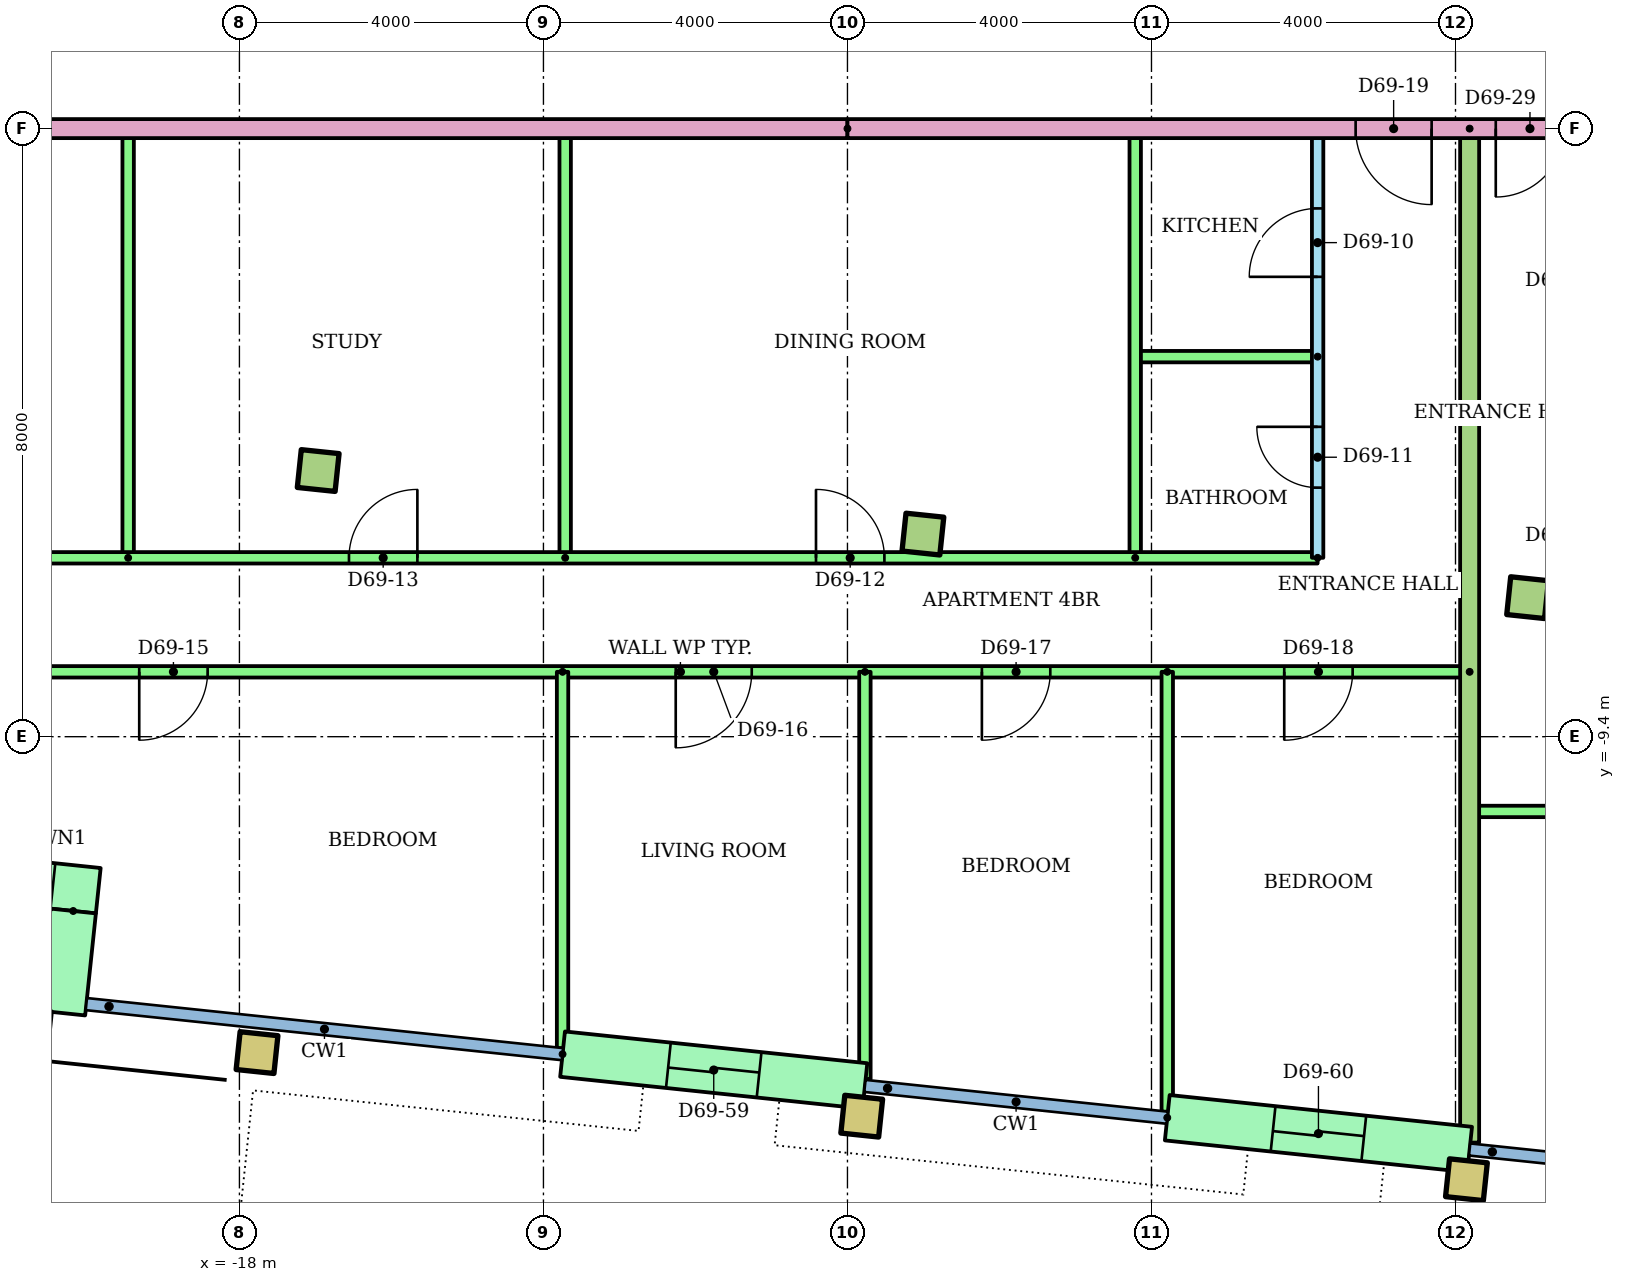
"""IFC4 building model, lengths in metres.
Left out: names, types, materials, properties, quantities, classifications, styles, units other than length and angle.
Written with IfcOpenShell. Run it as: python <this file> out.ifc"""

import sys

from ifc_helpers import new_model, si_unit, direction, frame, frame_2d, origin, origin_2d, place, context, subcontext, project, spatial, rectangle, hollow_rectangle, extrude, element, fill, save


model = new_model("IFC4")
c1 = context("Model", 3, precision=1e-05, world=origin(), true_north=direction((0.0, 1.0)))
c2 = subcontext(c1, "Body", "Model", "MODEL_VIEW")
j1 = project(units=[si_unit("LENGTHUNIT", "METRE"), si_unit("PLANEANGLEUNIT", "RADIAN")], contexts=[c1])
p1 = place(None, origin())
s1 = spatial("IfcSite", under=j1, at=p1, CompositionType="ELEMENT")
p2 = place(p1, origin())
s2 = spatial("IfcBuilding", under=s1, at=p2, CompositionType="ELEMENT")
p3 = place(p2, frame((0.0, 0.0, 265.9)))
s3 = spatial("IfcBuildingStorey", under=s2, at=p3, CompositionType="ELEMENT", Elevation=265.9)
for number, where, z_axis, x_axis in (
    (1, (-17.768, -13.556, 0.0), (0.0, 0.0, 1.0), (0.995, -0.105, 0.0)),
    (2, (-9.812, -14.392, 0.0), (0.0, 0.0, 1.0), (0.995, -0.105, 0.0)),
    (3, (-1.856, -15.229, 0.0), (0.0, 0.0, 1.0), (0.995, -0.105, 0.0)),
):
    element("IfcColumn", number, at=place(p3, frame(where, z_axis=z_axis, x_axis=x_axis)), inside=s3, PredefinedType="COLUMN", context=c2, shape_type="SweptSolid", body=[
        extrude(hollow_rectangle(XDim=0.5, YDim=0.5, WallThickness=0.025, at=origin_2d()), origin(), (0.0, 0.0, 1.0), 3.2),
    ])
for number, where, z_axis, x_axis in (
    (4, (-16.964, -5.898, 0.0), (0.0, 0.0, 1.0), (0.995, -0.105, 0.0)),
    (5, (-9.007, -6.735, 0.0), (0.0, 0.0, 1.0), (0.995, -0.105, 0.0)),
    (6, (-1.051, -7.571, 0.0), (0.0, 0.0, 1.0), (0.995, -0.105, 0.0)),
):
    element("IfcColumn", number, at=place(p3, frame(where, z_axis=z_axis, x_axis=x_axis)), inside=s3, PredefinedType="COLUMN", context=c2, shape_type="SweptSolid", body=[
        extrude(rectangle(XDim=0.5, YDim=0.5, at=origin_2d()), origin(), (0.0, 0.0, 1.0), 3.2),
    ])
p4 = place(p3, frame((-21.946, -11.207, 0.0), z_axis=(0.0, 0.0, 1.0), x_axis=(0.994511820899, -0.104624271047, 0.0)))
e7 = element("IfcWall", 7, at=p4, inside=s3, PredefinedType="STANDARD", context=c2, shape_type="SweptSolid", body=[
    extrude(rectangle(XDim=2.1, YDim=0.6, at=frame_2d((1.05, 0.0))), origin(), (0.0, 0.0, 1.0), 2.92),
])
p5 = place(p4, frame((0.6, 0.0, 0.9)))
e8 = element("IfcOpeningElement", 8, at=p5, cuts=e7, PredefinedType="OPENING", context=c2, shape_type="SweptSolid", body=[
    extrude(rectangle(XDim=0.9, YDim=1.5, at=frame_2d((0.45, 0.75))), frame((0.0, 0.31, 0.0), z_axis=(0.0, -1.0, 0.0), x_axis=(1.0, 0.0, 0.0)), (0.0, 0.0, 1.0), 0.62),
])
p6 = place(p3, frame((-20.187, -11.693, 0.0), z_axis=(0.0, 0.0, 1.0), x_axis=(-0.1043365026, -0.994542052517, 0.0)))
e9 = element("IfcWall", 9, at=p6, inside=s3, PredefinedType="STANDARD", context=c2, shape_type="SweptSolid", body=[
    extrude(rectangle(XDim=1.35, YDim=0.6, at=frame_2d((0.675, 0.0))), origin(), (0.0, 0.0, 1.0), 2.92),
])
p7 = place(p3, frame((-13.749, -13.576, 0.0), z_axis=(0.0, 0.0, 1.0), x_axis=(0.994519156568, -0.104554517933, 0.0)))
e10 = element("IfcWall", 10, at=p7, inside=s3, PredefinedType="STANDARD", context=c2, shape_type="SweptSolid", body=[
    extrude(rectangle(XDim=4.0, YDim=0.6, at=frame_2d((2.0, 0.0))), origin(), (0.0, 0.0, 1.0), 2.92),
])
p8 = place(p7, frame((1.4, 0.0, 0.0)))
e11 = element("IfcOpeningElement", 11, at=p8, cuts=e10, PredefinedType="OPENING", context=c2, shape_type="SweptSolid", body=[
    extrude(rectangle(XDim=1.2, YDim=2.1, at=frame_2d((0.6, 1.05))), frame((0.0, 0.31, 0.0), z_axis=(0.0, -1.0, 0.0), x_axis=(1.0, 0.0, 0.0)), (0.0, 0.0, 1.0), 0.62),
])
p9 = place(p3, frame((-5.792, -14.413, 0.0), z_axis=(0.0, 0.0, 1.0), x_axis=(0.99452550138, -0.104494148666, 0.0)))
e12 = element("IfcWall", 12, at=p9, inside=s3, PredefinedType="STANDARD", context=c2, shape_type="SweptSolid", body=[
    extrude(rectangle(XDim=4.0, YDim=0.6, at=frame_2d((2.0, 0.0))), origin(), (0.0, 0.0, 1.0), 2.92),
])
p10 = place(p9, frame((1.4, 0.0, 0.0)))
e13 = element("IfcOpeningElement", 13, at=p10, cuts=e12, PredefinedType="OPENING", context=c2, shape_type="SweptSolid", body=[
    extrude(rectangle(XDim=1.2, YDim=2.1, at=frame_2d((0.6, 1.05))), frame((0.0, 0.31, 0.0), z_axis=(0.0, -1.0, 0.0), x_axis=(1.0, 0.0, 0.0)), (0.0, 0.0, 1.0), 0.62),
])
p11 = place(p3, frame((-3.814, -7.047, 0.0), z_axis=(0.0, 0.0, 1.0), x_axis=(0.0, 1.0, 0.0)))
e14 = element("IfcWall", 14, at=p11, inside=s3, PredefinedType="PARTITIONING", context=c2, shape_type="SweptSolid", body=[
    extrude(rectangle(XDim=5.647, YDim=0.15, at=frame_2d((2.823, 0.0))), origin(), (0.0, 0.0, 1.0), 2.4),
])
p12 = place(p11, frame((3.697, 0.0, 0.0)))
e15 = element("IfcOpeningElement", 15, at=p12, cuts=e14, PredefinedType="OPENING", context=c2, shape_type="SweptSolid", body=[
    extrude(rectangle(XDim=0.9, YDim=2.1, at=frame_2d((0.45, 1.05))), frame((0.0, 0.085, 0.0), z_axis=(0.0, -1.0, 0.0), x_axis=(1.0, 0.0, 0.0)), (0.0, 0.0, 1.0), 0.17),
])
p13 = place(p11, frame((0.923, 0.0, 0.0)))
e16 = element("IfcOpeningElement", 16, at=p13, cuts=e14, PredefinedType="OPENING", context=c2, shape_type="SweptSolid", body=[
    extrude(rectangle(XDim=0.8, YDim=2.1, at=frame_2d((0.4, 1.05))), frame((0.0, 0.085, 0.0), z_axis=(0.0, -1.0, 0.0), x_axis=(1.0, 0.0, 0.0)), (0.0, 0.0, 1.0), 0.17),
])
p14 = place(p3, frame((-3.814, -4.4, 0.0), z_axis=(0.0, 0.0, 1.0), x_axis=(-1.0, 0.0, 0.0)))
e17 = element("IfcWall", 17, at=p14, inside=s3, PredefinedType="PARTITIONING", context=c2, shape_type="SweptSolid", body=[
    extrude(rectangle(XDim=2.4, YDim=0.15, at=frame_2d((1.2, 0.0))), origin(), (0.0, 0.0, 1.0), 2.4),
])
for number, where, z_axis, x_axis in (
    (18, (-6.214, -7.047, 0.0), (0.0, 0.0, 1.0), (0.0, 1.0, 0.0)),
    (19, (-13.714, -7.047, 0.0), (0.0, 0.0, 1.0), (0.0, 1.0, 0.0)),
    (20, (-19.464, -7.047, 0.0), (0.0, 0.0, 1.0), (0.0, 1.0, 0.0)),
):
    element("IfcWall", number, at=place(p3, frame(where, z_axis=z_axis, x_axis=x_axis)), inside=s3, PredefinedType="PARTITIONING", context=c2, shape_type="SweptSolid", body=[
        extrude(rectangle(XDim=5.647, YDim=0.15, at=frame_2d((2.823, 0.0))), origin(), (0.0, 0.0, 1.0), 2.4),
    ])
p15 = place(p3, frame((-24.144, -7.047, 0.0)))
e21 = element("IfcWall", 21, at=p15, inside=s3, PredefinedType="PARTITIONING", context=c2, shape_type="SweptSolid", body=[
    extrude(rectangle(XDim=20.33, YDim=0.15, at=frame_2d((10.165, 0.0))), origin(), (0.0, 0.0, 1.0), 2.4),
])
p16 = place(p15, frame((13.73, 0.0, 0.0)))
e22 = element("IfcOpeningElement", 22, at=p16, cuts=e21, PredefinedType="OPENING", context=c2, shape_type="SweptSolid", body=[
    extrude(rectangle(XDim=0.9, YDim=2.1, at=frame_2d((0.45, 1.05))), frame((0.0, 0.085, 0.0), z_axis=(0.0, -1.0, 0.0), x_axis=(1.0, 0.0, 0.0)), (0.0, 0.0, 1.0), 0.17),
])
p17 = place(p15, frame((7.585, 0.0, 0.0)))
e23 = element("IfcOpeningElement", 23, at=p17, cuts=e21, PredefinedType="OPENING", context=c2, shape_type="SweptSolid", body=[
    extrude(rectangle(XDim=0.9, YDim=2.1, at=frame_2d((0.45, 1.05))), frame((0.0, 0.085, 0.0), z_axis=(0.0, -1.0, 0.0), x_axis=(1.0, 0.0, 0.0)), (0.0, 0.0, 1.0), 0.17),
])
p18 = place(p15, frame((1.968, 0.0, 0.0)))
e24 = element("IfcOpeningElement", 24, at=p18, cuts=e21, PredefinedType="OPENING", context=c2, shape_type="SweptSolid", body=[
    extrude(rectangle(XDim=0.9, YDim=2.1, at=frame_2d((0.45, 1.05))), frame((0.0, 0.085, 0.0), z_axis=(0.0, -1.0, 0.0), x_axis=(1.0, 0.0, 0.0)), (0.0, 0.0, 1.0), 0.17),
])
p19 = place(p3, frame((-1.814, -8.547, 0.0), z_axis=(0.0, 0.0, 1.0), x_axis=(-1.0, 0.0, 0.0)))
e25 = element("IfcWall", 25, at=p19, inside=s3, PredefinedType="PARTITIONING", context=c2, shape_type="SweptSolid", body=[
    extrude(rectangle(XDim=20.767, YDim=0.15, at=frame_2d((10.384, 0.0))), origin(), (0.0, 0.0, 1.0), 2.4),
])
p20 = place(p19, frame((16.604, 0.0, 0.0)))
e26 = element("IfcOpeningElement", 26, at=p20, cuts=e25, PredefinedType="OPENING", context=c2, shape_type="SweptSolid", body=[
    extrude(rectangle(XDim=0.9, YDim=2.1, at=frame_2d((0.45, 1.05))), frame((0.0, 0.085, 0.0), z_axis=(0.0, -1.0, 0.0), x_axis=(1.0, 0.0, 0.0)), (0.0, 0.0, 1.0), 0.17),
])
p21 = place(p19, frame((9.446, 0.0, 0.0)))
e27 = element("IfcOpeningElement", 27, at=p21, cuts=e25, PredefinedType="OPENING", context=c2, shape_type="SweptSolid", body=[
    extrude(rectangle(XDim=1.0, YDim=2.1, at=frame_2d((0.5, 1.05))), frame((0.0, 0.085, 0.0), z_axis=(0.0, -1.0, 0.0), x_axis=(1.0, 0.0, 0.0)), (0.0, 0.0, 1.0), 0.17),
])
p22 = place(p19, frame((5.517, 0.0, 0.0)))
e28 = element("IfcOpeningElement", 28, at=p22, cuts=e25, PredefinedType="OPENING", context=c2, shape_type="SweptSolid", body=[
    extrude(rectangle(XDim=0.9, YDim=2.1, at=frame_2d((0.45, 1.05))), frame((0.0, 0.085, 0.0), z_axis=(0.0, -1.0, 0.0), x_axis=(1.0, 0.0, 0.0)), (0.0, 0.0, 1.0), 0.17),
])
p23 = place(p19, frame((1.539, 0.0, 0.0)))
e29 = element("IfcOpeningElement", 29, at=p23, cuts=e25, PredefinedType="OPENING", context=c2, shape_type="SweptSolid", body=[
    extrude(rectangle(XDim=0.9, YDim=2.1, at=frame_2d((0.45, 1.05))), frame((0.0, 0.085, 0.0), z_axis=(0.0, -1.0, 0.0), x_axis=(1.0, 0.0, 0.0)), (0.0, 0.0, 1.0), 0.17),
])
p24 = place(p3, frame((-13.749, -8.547, 0.0), z_axis=(0.0, 0.0, 1.0), x_axis=(0.0, -1.0, 0.0)))
e30 = element("IfcWall", 30, at=p24, inside=s3, PredefinedType="PARTITIONING", context=c2, shape_type="SweptSolid", body=[
    extrude(rectangle(XDim=4.95, YDim=0.15, at=frame_2d((2.475, 0.0))), origin(), (0.0, 0.0, 1.0), 2.4),
])
p25 = place(p3, frame((-9.771, -8.547, 0.0), z_axis=(0.0, 0.0, 1.0), x_axis=(0.0, -1.0, 0.0)))
e31 = element("IfcWall", 31, at=p25, inside=s3, PredefinedType="PARTITIONING", context=c2, shape_type="SweptSolid", body=[
    extrude(rectangle(XDim=5.358, YDim=0.15, at=frame_2d((2.679, 0.0))), origin(), (0.0, 0.0, 1.0), 2.4),
])
p26 = place(p3, frame((-5.792, -8.547, 0.0), z_axis=(0.0, 0.0, 1.0), x_axis=(0.0, -1.0, 0.0)))
e32 = element("IfcWall", 32, at=p26, inside=s3, PredefinedType="PARTITIONING", context=c2, shape_type="SweptSolid", body=[
    extrude(rectangle(XDim=5.787, YDim=0.15, at=frame_2d((2.893, 0.0))), origin(), (0.0, 0.0, 1.0), 2.4),
])
p27 = place(p3, frame((14.098, -10.384, 0.0), z_axis=(0.0, 0.0, 1.0), x_axis=(-1.0, 0.0, 0.0)))
e33 = element("IfcWall", 33, at=p27, inside=s3, PredefinedType="PARTITIONING", context=c2, shape_type="SweptSolid", body=[
    extrude(rectangle(XDim=15.912, YDim=0.15, at=frame_2d((7.956, 0.0))), origin(), (0.0, 0.0, 1.0), 2.4),
])
p28 = place(p27, frame((13.473, 0.0, 0.0)))
e34 = element("IfcOpeningElement", 34, at=p28, cuts=e33, PredefinedType="OPENING", context=c2, shape_type="SweptSolid", body=[
    extrude(rectangle(XDim=0.9, YDim=2.1, at=frame_2d((0.45, 1.05))), frame((0.0, 0.085, 0.0), z_axis=(0.0, -1.0, 0.0), x_axis=(1.0, 0.0, 0.0)), (0.0, 0.0, 1.0), 0.17),
])
p29 = place(p27, frame((9.495, 0.0, 0.0)))
e35 = element("IfcOpeningElement", 35, at=p29, cuts=e33, PredefinedType="OPENING", context=c2, shape_type="SweptSolid", body=[
    extrude(rectangle(XDim=0.9, YDim=2.1, at=frame_2d((0.45, 1.05))), frame((0.0, 0.085, 0.0), z_axis=(0.0, -1.0, 0.0), x_axis=(1.0, 0.0, 0.0)), (0.0, 0.0, 1.0), 0.17),
])
p30 = place(p27, frame((5.517, 0.0, 0.0)))
e36 = element("IfcOpeningElement", 36, at=p30, cuts=e33, PredefinedType="OPENING", context=c2, shape_type="SweptSolid", body=[
    extrude(rectangle(XDim=0.9, YDim=2.1, at=frame_2d((0.45, 1.05))), frame((0.0, 0.085, 0.0), z_axis=(0.0, -1.0, 0.0), x_axis=(1.0, 0.0, 0.0)), (0.0, 0.0, 1.0), 0.17),
])
p31 = place(p27, frame((1.489, 0.0, 0.0)))
e37 = element("IfcOpeningElement", 37, at=p31, cuts=e33, PredefinedType="OPENING", context=c2, shape_type="SweptSolid", body=[
    extrude(rectangle(XDim=1.0, YDim=2.1, at=frame_2d((0.5, 1.05))), frame((0.0, 0.085, 0.0), z_axis=(0.0, -1.0, 0.0), x_axis=(1.0, 0.0, 0.0)), (0.0, 0.0, 1.0), 0.17),
])
p32 = place(p3, frame((-1.814, -1.4, 0.0), z_axis=(0.0, 0.0, 1.0), x_axis=(0.0, -1.0, 0.0)))
e38 = element("IfcWall", 38, at=p32, inside=s3, PredefinedType="PARTITIONING", context=c2, shape_type="SweptSolid", body=[
    extrude(rectangle(XDim=13.341, YDim=0.25, at=frame_2d((6.67, 0.0))), origin(), (0.0, 0.0, 1.0), 2.4),
])
p33 = place(p3, frame((-10.0, -1.4, 0.0), z_axis=(0.0, 0.0, 1.0), x_axis=(-1.0, 0.0, 0.0)))
e39 = element("IfcWall", 39, at=p33, inside=s3, PredefinedType="PARTITIONING", context=c2, shape_type="SweptSolid", body=[
    extrude(rectangle(XDim=13.56, YDim=0.25, at=frame_2d((6.78, 0.0))), origin(), (0.0, 0.0, 1.0), 2.4),
])
p34 = place(p3, frame((10.0, -1.4, 0.0), z_axis=(0.0, 0.0, 1.0), x_axis=(-1.0, 0.0, 0.0)))
e40 = element("IfcWall", 40, at=p34, inside=s3, PredefinedType="PARTITIONING", context=c2, shape_type="SweptSolid", body=[
    extrude(rectangle(XDim=20.0, YDim=0.25, at=frame_2d((10.0, 0.0))), origin(), (0.0, 0.0, 1.0), 2.4),
])
p35 = place(p34, frame((12.314, 0.0, 0.0)))
e41 = element("IfcOpeningElement", 41, at=p35, cuts=e40, PredefinedType="OPENING", context=c2, shape_type="SweptSolid", body=[
    extrude(rectangle(XDim=1.0, YDim=2.1, at=frame_2d((0.5, 1.05))), frame((0.0, 0.135, 0.0), z_axis=(0.0, -1.0, 0.0), x_axis=(1.0, 0.0, 0.0)), (0.0, 0.0, 1.0), 0.27),
])
p36 = place(p34, frame((10.57, 0.0, 0.0)))
e42 = element("IfcOpeningElement", 42, at=p36, cuts=e40, PredefinedType="OPENING", context=c2, shape_type="SweptSolid", body=[
    extrude(rectangle(XDim=0.9, YDim=2.1, at=frame_2d((0.45, 1.05))), frame((0.0, 0.135, 0.0), z_axis=(0.0, -1.0, 0.0), x_axis=(1.0, 0.0, 0.0)), (0.0, 0.0, 1.0), 0.27),
])
p37 = place(p5, origin())
e43 = element("IfcWindow", 43, at=p37, inside=s3, PartitioningType="SINGLE_PANEL", PredefinedType="WINDOW", context=c2, shape_type="SweptSolid", body=[
    extrude(rectangle(XDim=0.9, YDim=1.5, at=frame_2d((0.45, 0.75))), frame((0.0, 0.03, 0.0), z_axis=(0.0, -1.0, 0.0), x_axis=(1.0, 0.0, 0.0)), (0.0, 0.0, 1.0), 0.06),
])
fill(e8, e43)
p38 = place(p12, origin())
e44 = element("IfcDoor", 44, at=p38, inside=s3, OperationType="SINGLE_SWING_LEFT", PredefinedType="DOOR", context=c2, shape_type="SweptSolid", body=[
    extrude(rectangle(XDim=0.9, YDim=2.1, at=frame_2d((0.45, 1.05))), frame((0.0, 0.025, 0.0), z_axis=(0.0, -1.0, 0.0), x_axis=(1.0, 0.0, 0.0)), (0.0, 0.0, 1.0), 0.05),
])
fill(e15, e44)
p39 = place(p13, origin())
e45 = element("IfcDoor", 45, at=p39, inside=s3, OperationType="SINGLE_SWING_RIGHT", PredefinedType="DOOR", context=c2, shape_type="SweptSolid", body=[
    extrude(rectangle(XDim=0.8, YDim=2.1, at=frame_2d((0.4, 1.05))), frame((0.0, 0.025, 0.0), z_axis=(0.0, -1.0, 0.0), x_axis=(1.0, 0.0, 0.0)), (0.0, 0.0, 1.0), 0.05),
])
fill(e16, e45)
p40 = place(p16, origin())
e46 = element("IfcDoor", 46, at=p40, inside=s3, OperationType="SINGLE_SWING_LEFT", PredefinedType="DOOR", context=c2, shape_type="SweptSolid", body=[
    extrude(rectangle(XDim=0.9, YDim=2.1, at=frame_2d((0.45, 1.05))), frame((0.0, 0.025, 0.0), z_axis=(0.0, -1.0, 0.0), x_axis=(1.0, 0.0, 0.0)), (0.0, 0.0, 1.0), 0.05),
])
fill(e22, e46)
p41 = place(p17, origin())
e47 = element("IfcDoor", 47, at=p41, inside=s3, OperationType="SINGLE_SWING_RIGHT", PredefinedType="DOOR", context=c2, shape_type="SweptSolid", body=[
    extrude(rectangle(XDim=0.9, YDim=2.1, at=frame_2d((0.45, 1.05))), frame((0.0, 0.025, 0.0), z_axis=(0.0, -1.0, 0.0), x_axis=(1.0, 0.0, 0.0)), (0.0, 0.0, 1.0), 0.05),
])
fill(e23, e47)
p42 = place(p20, origin())
e48 = element("IfcDoor", 48, at=p42, inside=s3, OperationType="SINGLE_SWING_RIGHT", PredefinedType="DOOR", context=c2, shape_type="SweptSolid", body=[
    extrude(rectangle(XDim=0.9, YDim=2.1, at=frame_2d((0.45, 1.05))), frame((0.0, 0.025, 0.0), z_axis=(0.0, -1.0, 0.0), x_axis=(1.0, 0.0, 0.0)), (0.0, 0.0, 1.0), 0.05),
])
fill(e26, e48)
p43 = place(p21, origin())
e49 = element("IfcDoor", 49, at=p43, inside=s3, OperationType="SINGLE_SWING_RIGHT", PredefinedType="DOOR", context=c2, shape_type="SweptSolid", body=[
    extrude(rectangle(XDim=1.0, YDim=2.1, at=frame_2d((0.5, 1.05))), frame((0.0, 0.025, 0.0), z_axis=(0.0, -1.0, 0.0), x_axis=(1.0, 0.0, 0.0)), (0.0, 0.0, 1.0), 0.05),
])
fill(e27, e49)
p44 = place(p22, origin())
e50 = element("IfcDoor", 50, at=p44, inside=s3, OperationType="SINGLE_SWING_RIGHT", PredefinedType="DOOR", context=c2, shape_type="SweptSolid", body=[
    extrude(rectangle(XDim=0.9, YDim=2.1, at=frame_2d((0.45, 1.05))), frame((0.0, 0.025, 0.0), z_axis=(0.0, -1.0, 0.0), x_axis=(1.0, 0.0, 0.0)), (0.0, 0.0, 1.0), 0.05),
])
fill(e28, e50)
p45 = place(p23, origin())
e51 = element("IfcDoor", 51, at=p45, inside=s3, OperationType="SINGLE_SWING_RIGHT", PredefinedType="DOOR", context=c2, shape_type="SweptSolid", body=[
    extrude(rectangle(XDim=0.9, YDim=2.1, at=frame_2d((0.45, 1.05))), frame((0.0, 0.025, 0.0), z_axis=(0.0, -1.0, 0.0), x_axis=(1.0, 0.0, 0.0)), (0.0, 0.0, 1.0), 0.05),
])
fill(e29, e51)
p46 = place(p35, origin())
e52 = element("IfcDoor", 52, at=p46, inside=s3, OperationType="SINGLE_SWING_LEFT", PredefinedType="DOOR", context=c2, shape_type="SweptSolid", body=[
    extrude(rectangle(XDim=1.0, YDim=2.1, at=frame_2d((0.5, 1.05))), frame((0.0, 0.025, 0.0), z_axis=(0.0, -1.0, 0.0), x_axis=(1.0, 0.0, 0.0)), (0.0, 0.0, 1.0), 0.05),
])
fill(e41, e52)
p47 = place(p36, origin())
e53 = element("IfcDoor", 53, at=p47, inside=s3, OperationType="SINGLE_SWING_RIGHT", PredefinedType="DOOR", context=c2, shape_type="SweptSolid", body=[
    extrude(rectangle(XDim=0.9, YDim=2.1, at=frame_2d((0.45, 1.05))), frame((0.0, 0.025, 0.0), z_axis=(0.0, -1.0, 0.0), x_axis=(1.0, 0.0, 0.0)), (0.0, 0.0, 1.0), 0.05),
])
fill(e42, e53)
p48 = place(p8, origin())
e54 = element("IfcDoor", 54, at=p48, inside=s3, OperationType="SLIDING_TO_LEFT", PredefinedType="DOOR", context=c2, shape_type="SweptSolid", body=[
    extrude(rectangle(XDim=1.2, YDim=2.1, at=frame_2d((0.6, 1.05))), frame((0.0, 0.025, 0.0), z_axis=(0.0, -1.0, 0.0), x_axis=(1.0, 0.0, 0.0)), (0.0, 0.0, 1.0), 0.05),
])
fill(e11, e54)
p49 = place(p10, origin())
e55 = element("IfcDoor", 55, at=p49, inside=s3, OperationType="SLIDING_TO_LEFT", PredefinedType="DOOR", context=c2, shape_type="SweptSolid", body=[
    extrude(rectangle(XDim=1.2, YDim=2.1, at=frame_2d((0.6, 1.05))), frame((0.0, 0.025, 0.0), z_axis=(0.0, -1.0, 0.0), x_axis=(1.0, 0.0, 0.0)), (0.0, 0.0, 1.0), 0.05),
])
fill(e13, e55)
save(model, sys.argv[1])
